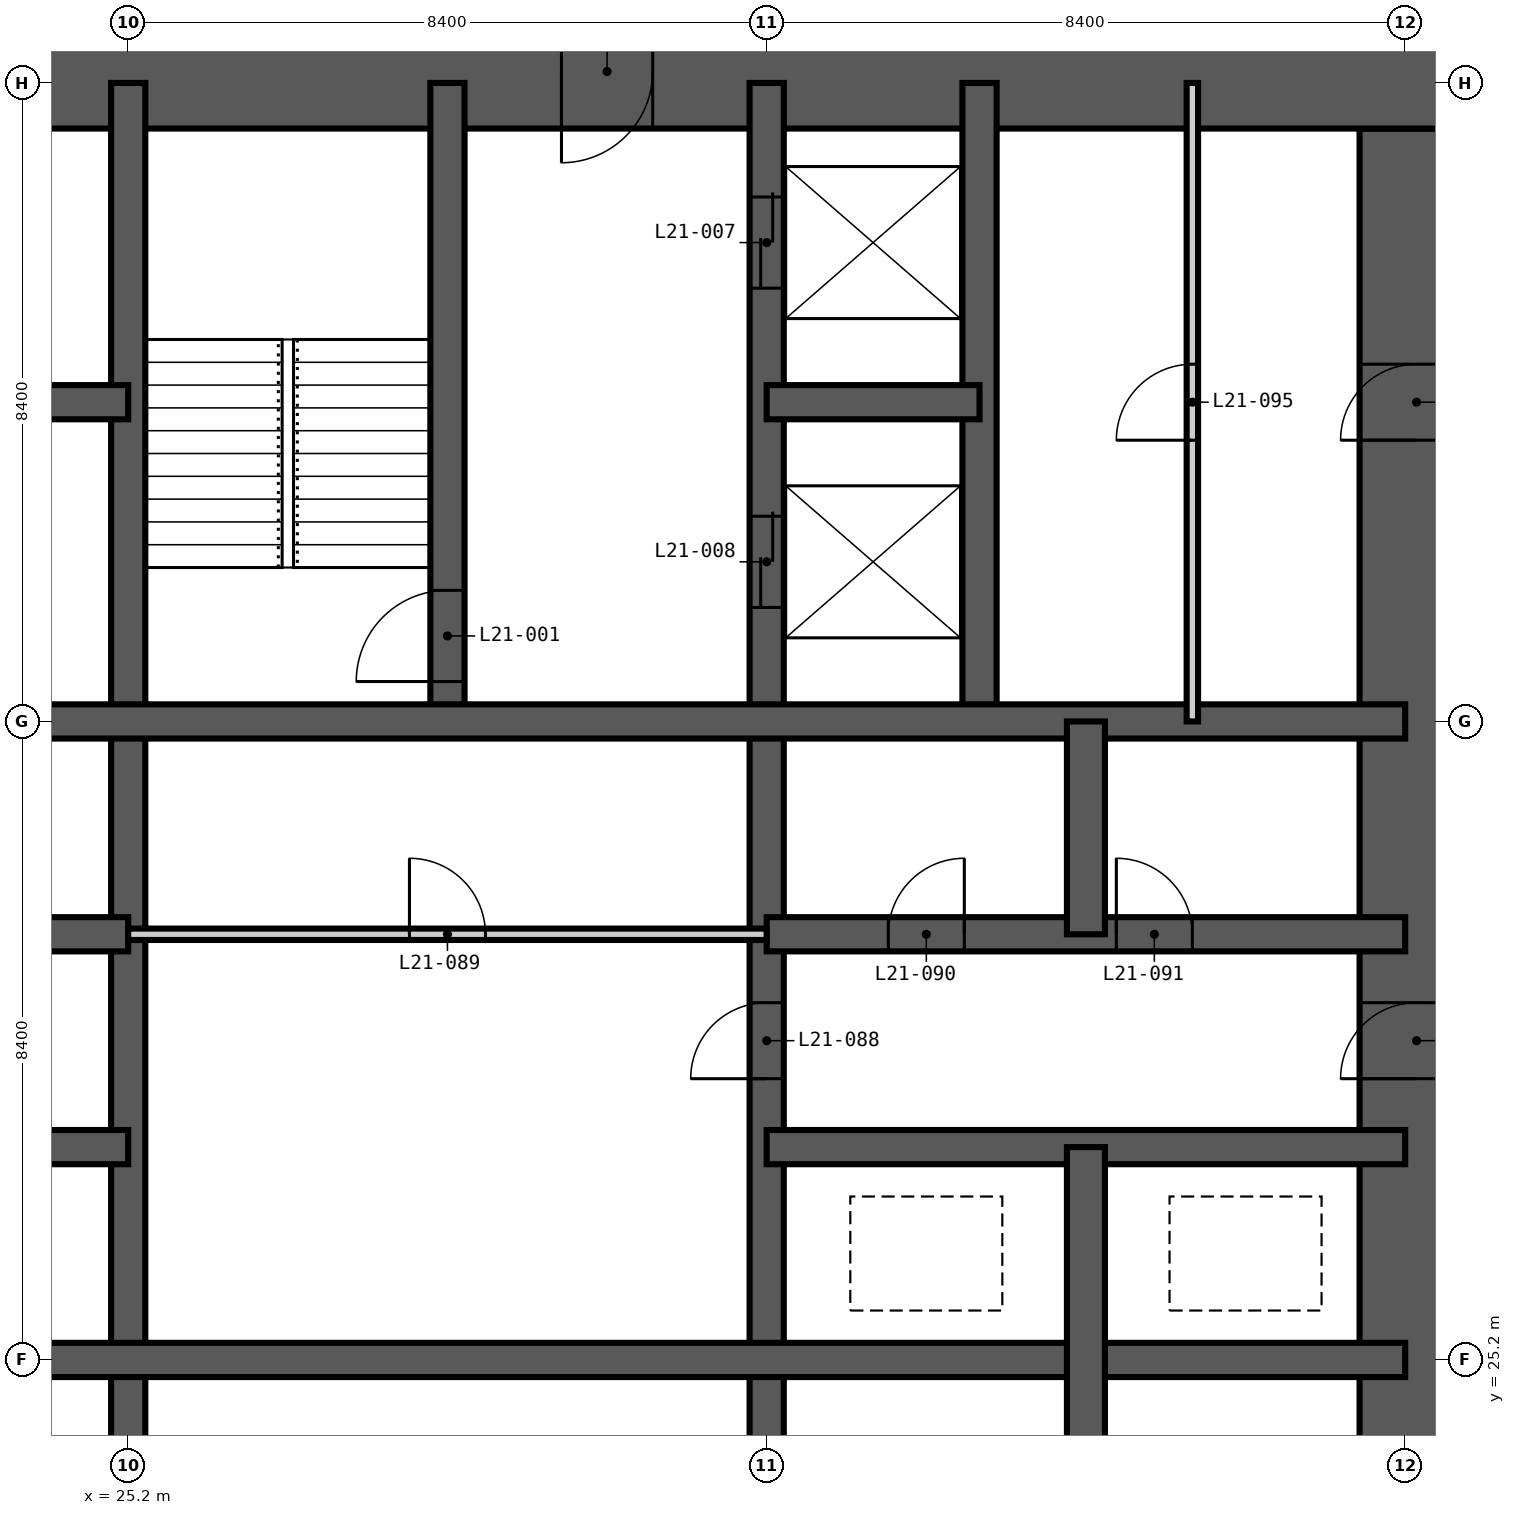
"""IFC4 building model, lengths in metres.
Left out: names, types, materials, properties, quantities, classifications, styles, units other than length and angle.
Written with IfcOpenShell. Run it as: python <this file> out.ifc"""

import sys

from ifc_helpers import new_model, si_unit, direction, frame, frame_2d, origin, place, context, subcontext, project, spatial, rectangle, extrude, element, fill, save


model = new_model("IFC4")
c1 = context("Model", 3, precision=1e-05, world=origin(), true_north=direction((0.0, 1.0)))
c2 = subcontext(c1, "Body", "Model", "MODEL_VIEW")
j1 = project(units=[si_unit("LENGTHUNIT", "METRE"), si_unit("PLANEANGLEUNIT", "RADIAN")], contexts=[c1])
p1 = place(None, origin())
s1 = spatial("IfcSite", under=j1, at=p1, CompositionType="ELEMENT")
p2 = place(p1, origin())
s2 = spatial("IfcBuilding", under=s1, at=p2, CompositionType="ELEMENT")
p3 = place(p2, frame((0.0, 0.0, 84.6)))
s3 = spatial("IfcBuildingStorey", under=s2, at=p3, CompositionType="ELEMENT", Elevation=84.6)
p4 = place(p3, frame((42.15, 17.4, -0.35), z_axis=(0.0, 0.0, 1.0), x_axis=(0.0, 1.0, 0.0)))
e1 = element("IfcWall", 1, at=p4, inside=s3, PredefinedType="SHEAR", context=c2, shape_type="SweptSolid", body=[
    extrude(rectangle(XDim=24.0, YDim=1.5, at=frame_2d((12.0, 0.0))), origin(), (0.0, 0.0, 1.0), 3.55),
])
p5 = place(p4, frame((0.2, 0.0, 0.35)))
e2 = element("IfcOpeningElement", 2, at=p5, cuts=e1, PredefinedType="OPENING", context=c2, shape_type="SweptSolid", body=[
    extrude(rectangle(XDim=1.2, YDim=2.2, at=frame_2d((0.6, 1.1))), frame((0.0, 0.76, 0.0), z_axis=(0.0, -1.0, 0.0), x_axis=(1.0, 0.0, 0.0)), (0.0, 0.0, 1.0), 1.52),
])
p6 = place(p4, frame((11.5, 0.0, 0.35)))
e3 = element("IfcOpeningElement", 3, at=p6, cuts=e1, PredefinedType="OPENING", context=c2, shape_type="SweptSolid", body=[
    extrude(rectangle(XDim=1.0, YDim=2.1, at=frame_2d((0.5, 1.05))), frame((0.0, 0.76, 0.0), z_axis=(0.0, -1.0, 0.0), x_axis=(1.0, 0.0, 0.0)), (0.0, 0.0, 1.0), 1.52),
])
p7 = place(p4, frame((19.9, 0.0, 0.35)))
e4 = element("IfcOpeningElement", 4, at=p7, cuts=e1, PredefinedType="OPENING", context=c2, shape_type="SweptSolid", body=[
    extrude(rectangle(XDim=1.0, YDim=2.1, at=frame_2d((0.5, 1.05))), frame((0.0, 0.76, 0.0), z_axis=(0.0, -1.0, 0.0), x_axis=(1.0, 0.0, 0.0)), (0.0, 0.0, 1.0), 1.52),
])
p8 = place(p3, frame((42.9, 42.15, -0.35), z_axis=(0.0, 0.0, 1.0), x_axis=(-1.0, 0.0, 0.0)))
e5 = element("IfcWall", 5, at=p8, inside=s3, PredefinedType="SHEAR", context=c2, shape_type="SweptSolid", body=[
    extrude(rectangle(XDim=27.0, YDim=1.5, at=frame_2d((13.5, 0.0))), origin(), (0.0, 0.0, 1.0), 3.55),
])
p9 = place(p8, frame((21.4, 0.0, 0.35)))
e6 = element("IfcOpeningElement", 6, at=p9, cuts=e5, PredefinedType="OPENING", context=c2, shape_type="SweptSolid", body=[
    extrude(rectangle(XDim=1.0, YDim=2.1, at=frame_2d((0.5, 1.05))), frame((0.0, 0.76, 0.0), z_axis=(0.0, -1.0, 0.0), x_axis=(1.0, 0.0, 0.0)), (0.0, 0.0, 1.0), 1.52),
])
p10 = place(p8, frame((10.8, 0.0, 0.35)))
e7 = element("IfcOpeningElement", 7, at=p10, cuts=e5, PredefinedType="OPENING", context=c2, shape_type="SweptSolid", body=[
    extrude(rectangle(XDim=1.2, YDim=2.2, at=frame_2d((0.6, 1.1))), frame((0.0, 0.76, 0.0), z_axis=(0.0, -1.0, 0.0), x_axis=(1.0, 0.0, 0.0)), (0.0, 0.0, 1.0), 1.52),
])
p11 = place(p3, frame((25.2, 16.8, -0.35), z_axis=(0.0, 0.0, 1.0), x_axis=(0.0, 1.0, 0.0)))
e8 = element("IfcWall", 8, at=p11, inside=s3, PredefinedType="SHEAR", context=c2, shape_type="SweptSolid", body=[
    extrude(rectangle(XDim=25.2, YDim=0.45, at=frame_2d((12.6, 0.0))), origin(), (0.0, 0.0, 1.0), 3.55),
])
p12 = place(p3, frame((29.4, 33.6, -0.35), z_axis=(0.0, 0.0, 1.0), x_axis=(0.0, 1.0, 0.0)))
e9 = element("IfcWall", 9, at=p12, inside=s3, PredefinedType="SHEAR", context=c2, shape_type="SweptSolid", body=[
    extrude(rectangle(XDim=8.4, YDim=0.45, at=frame_2d((4.2, 0.0))), origin(), (0.0, 0.0, 1.0), 3.55),
])
p13 = place(p12, frame((0.525, 0.0, 0.35)))
e10 = element("IfcOpeningElement", 10, at=p13, cuts=e9, PredefinedType="OPENING", context=c2, shape_type="SweptSolid", body=[
    extrude(rectangle(XDim=1.2, YDim=2.2, at=frame_2d((0.6, 1.1))), frame((0.0, 0.235, 0.0), z_axis=(0.0, -1.0, 0.0), x_axis=(1.0, 0.0, 0.0)), (0.0, 0.0, 1.0), 0.47),
])
p14 = place(p3, frame((33.6, 16.8, -0.35), z_axis=(0.0, 0.0, 1.0), x_axis=(0.0, 1.0, 0.0)))
e11 = element("IfcWall", 11, at=p14, inside=s3, PredefinedType="SHEAR", context=c2, shape_type="SweptSolid", body=[
    extrude(rectangle(XDim=25.2, YDim=0.45, at=frame_2d((12.6, 0.0))), origin(), (0.0, 0.0, 1.0), 3.55),
])
p15 = place(p14, frame((22.5, 0.0, 0.35)))
e12 = element("IfcOpeningElement", 12, at=p15, cuts=e11, PredefinedType="OPENING", context=c2, shape_type="SweptSolid", body=[
    extrude(rectangle(XDim=1.2, YDim=2.2, at=frame_2d((0.6, 1.1))), frame((0.0, 0.235, 0.0), z_axis=(0.0, -1.0, 0.0), x_axis=(1.0, 0.0, 0.0)), (0.0, 0.0, 1.0), 0.47),
])
p16 = place(p14, frame((18.3, 0.0, 0.35)))
e13 = element("IfcOpeningElement", 13, at=p16, cuts=e11, PredefinedType="OPENING", context=c2, shape_type="SweptSolid", body=[
    extrude(rectangle(XDim=1.2, YDim=2.2, at=frame_2d((0.6, 1.1))), frame((0.0, 0.235, 0.0), z_axis=(0.0, -1.0, 0.0), x_axis=(1.0, 0.0, 0.0)), (0.0, 0.0, 1.0), 0.47),
])
p17 = place(p14, frame((12.1, 0.0, 0.35)))
e14 = element("IfcOpeningElement", 14, at=p17, cuts=e11, PredefinedType="OPENING", context=c2, shape_type="SweptSolid", body=[
    extrude(rectangle(XDim=1.0, YDim=2.1, at=frame_2d((0.5, 1.05))), frame((0.0, 0.235, 0.0), z_axis=(0.0, -1.0, 0.0), x_axis=(1.0, 0.0, 0.0)), (0.0, 0.0, 1.0), 0.47),
])
p18 = place(p3, frame((36.4, 33.6, -0.35), z_axis=(0.0, 0.0, 1.0), x_axis=(0.0, 1.0, 0.0)))
e15 = element("IfcWall", 15, at=p18, inside=s3, PredefinedType="SHEAR", context=c2, shape_type="SweptSolid", body=[
    extrude(rectangle(XDim=8.4, YDim=0.45, at=frame_2d((4.2, 0.0))), origin(), (0.0, 0.0, 1.0), 3.55),
])
p19 = place(p3, frame((16.8, 25.2, -0.35), z_axis=(0.0, 0.0, 1.0), x_axis=(1.0, 0.0, 0.0)))
e16 = element("IfcWall", 16, at=p19, inside=s3, PredefinedType="SHEAR", context=c2, shape_type="SweptSolid", body=[
    extrude(rectangle(XDim=25.2, YDim=0.45, at=frame_2d((12.6, 0.0))), origin(), (0.0, 0.0, 1.0), 3.55),
])
p20 = place(p3, frame((16.8, 28.0, -0.35), z_axis=(0.0, 0.0, 1.0), x_axis=(1.0, 0.0, 0.0)))
e17 = element("IfcWall", 17, at=p20, inside=s3, PredefinedType="SHEAR", context=c2, shape_type="SweptSolid", body=[
    extrude(rectangle(XDim=8.4, YDim=0.45, at=frame_2d((4.2, 0.0))), origin(), (0.0, 0.0, 1.0), 3.55),
])
p21 = place(p20, frame((1.55, 0.0, 0.35)))
e18 = element("IfcOpeningElement", 18, at=p21, cuts=e17, PredefinedType="OPENING", context=c2, shape_type="SweptSolid", body=[
    extrude(rectangle(XDim=1.1, YDim=2.2, at=frame_2d((0.55, 1.1))), frame((0.0, 0.235, 0.0), z_axis=(0.0, -1.0, 0.0), x_axis=(1.0, 0.0, 0.0)), (0.0, 0.0, 1.0), 0.47),
])
p22 = place(p20, frame((5.75, 0.0, 0.35)))
e19 = element("IfcOpeningElement", 19, at=p22, cuts=e17, PredefinedType="OPENING", context=c2, shape_type="SweptSolid", body=[
    extrude(rectangle(XDim=1.1, YDim=2.2, at=frame_2d((0.55, 1.1))), frame((0.0, 0.235, 0.0), z_axis=(0.0, -1.0, 0.0), x_axis=(1.0, 0.0, 0.0)), (0.0, 0.0, 1.0), 0.47),
])
p23 = place(p3, frame((33.6, 28.0, -0.35), z_axis=(0.0, 0.0, 1.0), x_axis=(1.0, 0.0, 0.0)))
e20 = element("IfcWall", 20, at=p23, inside=s3, PredefinedType="SHEAR", context=c2, shape_type="SweptSolid", body=[
    extrude(rectangle(XDim=8.4, YDim=0.45, at=frame_2d((4.2, 0.0))), origin(), (0.0, 0.0, 1.0), 3.55),
])
p24 = place(p3, frame((16.8, 30.8, -0.35), z_axis=(0.0, 0.0, 1.0), x_axis=(1.0, 0.0, 0.0)))
e21 = element("IfcWall", 21, at=p24, inside=s3, PredefinedType="SHEAR", context=c2, shape_type="SweptSolid", body=[
    extrude(rectangle(XDim=8.4, YDim=0.45, at=frame_2d((4.2, 0.0))), origin(), (0.0, 0.0, 1.0), 3.55),
])
p25 = place(p24, frame((1.55, 0.0, 0.35)))
e22 = element("IfcOpeningElement", 22, at=p25, cuts=e21, PredefinedType="OPENING", context=c2, shape_type="SweptSolid", body=[
    extrude(rectangle(XDim=1.1, YDim=2.2, at=frame_2d((0.55, 1.1))), frame((0.0, 0.235, 0.0), z_axis=(0.0, -1.0, 0.0), x_axis=(1.0, 0.0, 0.0)), (0.0, 0.0, 1.0), 0.47),
])
p26 = place(p24, frame((5.75, 0.0, 0.35)))
e23 = element("IfcOpeningElement", 23, at=p26, cuts=e21, PredefinedType="OPENING", context=c2, shape_type="SweptSolid", body=[
    extrude(rectangle(XDim=1.1, YDim=2.2, at=frame_2d((0.55, 1.1))), frame((0.0, 0.235, 0.0), z_axis=(0.0, -1.0, 0.0), x_axis=(1.0, 0.0, 0.0)), (0.0, 0.0, 1.0), 0.47),
])
p27 = place(p3, frame((33.6, 30.8, -0.35), z_axis=(0.0, 0.0, 1.0), x_axis=(1.0, 0.0, 0.0)))
e24 = element("IfcWall", 24, at=p27, inside=s3, PredefinedType="SHEAR", context=c2, shape_type="SweptSolid", body=[
    extrude(rectangle(XDim=8.4, YDim=0.45, at=frame_2d((4.2, 0.0))), origin(), (0.0, 0.0, 1.0), 3.55),
])
p28 = place(p27, frame((1.6, 0.0, 0.35)))
e25 = element("IfcOpeningElement", 25, at=p28, cuts=e24, PredefinedType="OPENING", context=c2, shape_type="SweptSolid", body=[
    extrude(rectangle(XDim=1.0, YDim=2.1, at=frame_2d((0.5, 1.05))), frame((0.0, 0.235, 0.0), z_axis=(0.0, -1.0, 0.0), x_axis=(1.0, 0.0, 0.0)), (0.0, 0.0, 1.0), 0.47),
])
p29 = place(p27, frame((4.6, 0.0, 0.35)))
e26 = element("IfcOpeningElement", 26, at=p29, cuts=e24, PredefinedType="OPENING", context=c2, shape_type="SweptSolid", body=[
    extrude(rectangle(XDim=1.0, YDim=2.1, at=frame_2d((0.5, 1.05))), frame((0.0, 0.235, 0.0), z_axis=(0.0, -1.0, 0.0), x_axis=(1.0, 0.0, 0.0)), (0.0, 0.0, 1.0), 0.47),
])
p30 = place(p3, frame((16.8, 33.6, -0.35), z_axis=(0.0, 0.0, 1.0), x_axis=(1.0, 0.0, 0.0)))
e27 = element("IfcWall", 27, at=p30, inside=s3, PredefinedType="SHEAR", context=c2, shape_type="SweptSolid", body=[
    extrude(rectangle(XDim=25.2, YDim=0.45, at=frame_2d((12.6, 0.0))), origin(), (0.0, 0.0, 1.0), 3.55),
])
p31 = place(p3, frame((16.8, 37.8, -0.35), z_axis=(0.0, 0.0, 1.0), x_axis=(1.0, 0.0, 0.0)))
e28 = element("IfcWall", 28, at=p31, inside=s3, PredefinedType="SHEAR", context=c2, shape_type="SweptSolid", body=[
    extrude(rectangle(XDim=8.4, YDim=0.45, at=frame_2d((4.2, 0.0))), origin(), (0.0, 0.0, 1.0), 3.55),
])
p32 = place(p3, frame((33.6, 37.8, -0.35), z_axis=(0.0, 0.0, 1.0), x_axis=(1.0, 0.0, 0.0)))
e29 = element("IfcWall", 29, at=p32, inside=s3, PredefinedType="SHEAR", context=c2, shape_type="SweptSolid", body=[
    extrude(rectangle(XDim=2.8, YDim=0.45, at=frame_2d((1.4, 0.0))), origin(), (0.0, 0.0, 1.0), 3.55),
])
p33 = place(p3, frame((37.8, 16.8, -0.35), z_axis=(0.0, 0.0, 1.0), x_axis=(0.0, 1.0, 0.0)))
e30 = element("IfcWall", 30, at=p33, inside=s3, PredefinedType="SHEAR", context=c2, shape_type="SweptSolid", body=[
    extrude(rectangle(XDim=11.2, YDim=0.5, at=frame_2d((5.6, 0.0))), origin(), (0.0, 0.0, 1.0), 3.55),
])
p34 = place(p3, frame((37.8, 30.8, -0.35), z_axis=(0.0, 0.0, 1.0), x_axis=(0.0, 1.0, 0.0)))
e31 = element("IfcWall", 31, at=p34, inside=s3, PredefinedType="SHEAR", context=c2, shape_type="SweptSolid", body=[
    extrude(rectangle(XDim=2.8, YDim=0.5, at=frame_2d((1.4, 0.0))), origin(), (0.0, 0.0, 1.0), 3.55),
])
p35 = place(p3, frame((39.2, 33.6, 0.0), z_axis=(0.0, 0.0, 1.0), x_axis=(0.0, 1.0, 0.0)))
e32 = element("IfcWall", 32, at=p35, inside=s3, PredefinedType="PARTITIONING", context=c2, shape_type="SweptSolid", body=[
    extrude(rectangle(XDim=8.4, YDim=0.15, at=frame_2d((4.2, 0.0))), origin(), (0.0, 0.0, 1.0), 3.2),
])
p36 = place(p35, frame((3.7, 0.0, 0.0)))
e33 = element("IfcOpeningElement", 33, at=p36, cuts=e32, PredefinedType="OPENING", context=c2, shape_type="SweptSolid", body=[
    extrude(rectangle(XDim=1.0, YDim=2.1, at=frame_2d((0.5, 1.05))), frame((0.0, 0.085, 0.0), z_axis=(0.0, -1.0, 0.0), x_axis=(1.0, 0.0, 0.0)), (0.0, 0.0, 1.0), 0.17),
])
p37 = place(p3, frame((25.2, 30.8, 0.0), z_axis=(0.0, 0.0, 1.0), x_axis=(1.0, 0.0, 0.0)))
e34 = element("IfcWall", 34, at=p37, inside=s3, PredefinedType="PARTITIONING", context=c2, shape_type="SweptSolid", body=[
    extrude(rectangle(XDim=8.4, YDim=0.15, at=frame_2d((4.2, 0.0))), origin(), (0.0, 0.0, 1.0), 3.2),
])
p38 = place(p37, frame((3.7, 0.0, 0.0)))
e35 = element("IfcOpeningElement", 35, at=p38, cuts=e34, PredefinedType="OPENING", context=c2, shape_type="SweptSolid", body=[
    extrude(rectangle(XDim=1.0, YDim=2.1, at=frame_2d((0.5, 1.05))), frame((0.0, 0.085, 0.0), z_axis=(0.0, -1.0, 0.0), x_axis=(1.0, 0.0, 0.0)), (0.0, 0.0, 1.0), 0.17),
])
p39 = place(p13, origin())
e36 = element("IfcDoor", 36, at=p39, inside=s3, OperationType="SINGLE_SWING_LEFT", PredefinedType="DOOR", context=c2, shape_type="SweptSolid", body=[
    extrude(rectangle(XDim=1.2, YDim=2.2, at=frame_2d((0.6, 1.1))), frame((0.0, 0.025, 0.0), z_axis=(0.0, -1.0, 0.0), x_axis=(1.0, 0.0, 0.0)), (0.0, 0.0, 1.0), 0.05),
])
fill(e10, e36)
p40 = place(p15, origin())
e37 = element("IfcDoor", 37, at=p40, inside=s3, OperationType="DOUBLE_DOOR_SLIDING", PredefinedType="DOOR", context=c2, shape_type="SweptSolid", body=[
    extrude(rectangle(XDim=1.2, YDim=2.2, at=frame_2d((0.6, 1.1))), frame((0.0, 0.025, 0.0), z_axis=(0.0, -1.0, 0.0), x_axis=(1.0, 0.0, 0.0)), (0.0, 0.0, 1.0), 0.05),
])
fill(e12, e37)
p41 = place(p16, origin())
e38 = element("IfcDoor", 38, at=p41, inside=s3, OperationType="DOUBLE_DOOR_SLIDING", PredefinedType="DOOR", context=c2, shape_type="SweptSolid", body=[
    extrude(rectangle(XDim=1.2, YDim=2.2, at=frame_2d((0.6, 1.1))), frame((0.0, 0.025, 0.0), z_axis=(0.0, -1.0, 0.0), x_axis=(1.0, 0.0, 0.0)), (0.0, 0.0, 1.0), 0.05),
])
fill(e13, e38)
p42 = place(p17, origin())
e39 = element("IfcDoor", 39, at=p42, inside=s3, OperationType="SINGLE_SWING_LEFT", PredefinedType="DOOR", context=c2, shape_type="SweptSolid", body=[
    extrude(rectangle(XDim=1.0, YDim=2.1, at=frame_2d((0.5, 1.05))), frame((0.0, 0.025, 0.0), z_axis=(0.0, -1.0, 0.0), x_axis=(1.0, 0.0, 0.0)), (0.0, 0.0, 1.0), 0.05),
])
fill(e14, e39)
p43 = place(p38, origin())
e40 = element("IfcDoor", 40, at=p43, inside=s3, OperationType="SINGLE_SWING_LEFT", PredefinedType="DOOR", context=c2, shape_type="SweptSolid", body=[
    extrude(rectangle(XDim=1.0, YDim=2.1, at=frame_2d((0.5, 1.05))), frame((0.0, 0.025, 0.0), z_axis=(0.0, -1.0, 0.0), x_axis=(1.0, 0.0, 0.0)), (0.0, 0.0, 1.0), 0.05),
])
fill(e35, e40)
p44 = place(p28, origin())
e41 = element("IfcDoor", 41, at=p44, inside=s3, OperationType="SINGLE_SWING_RIGHT", PredefinedType="DOOR", context=c2, shape_type="SweptSolid", body=[
    extrude(rectangle(XDim=1.0, YDim=2.1, at=frame_2d((0.5, 1.05))), frame((0.0, 0.025, 0.0), z_axis=(0.0, -1.0, 0.0), x_axis=(1.0, 0.0, 0.0)), (0.0, 0.0, 1.0), 0.05),
])
fill(e25, e41)
p45 = place(p29, origin())
e42 = element("IfcDoor", 42, at=p45, inside=s3, OperationType="SINGLE_SWING_LEFT", PredefinedType="DOOR", context=c2, shape_type="SweptSolid", body=[
    extrude(rectangle(XDim=1.0, YDim=2.1, at=frame_2d((0.5, 1.05))), frame((0.0, 0.025, 0.0), z_axis=(0.0, -1.0, 0.0), x_axis=(1.0, 0.0, 0.0)), (0.0, 0.0, 1.0), 0.05),
])
fill(e26, e42)
p46 = place(p6, origin())
e43 = element("IfcDoor", 43, at=p46, inside=s3, OperationType="SINGLE_SWING_LEFT", PredefinedType="DOOR", context=c2, shape_type="SweptSolid", body=[
    extrude(rectangle(XDim=1.0, YDim=2.1, at=frame_2d((0.5, 1.05))), frame((0.0, 0.025, 0.0), z_axis=(0.0, -1.0, 0.0), x_axis=(1.0, 0.0, 0.0)), (0.0, 0.0, 1.0), 0.05),
])
fill(e3, e43)
p47 = place(p10, origin())
e44 = element("IfcDoor", 44, at=p47, inside=s3, OperationType="SINGLE_SWING_RIGHT", PredefinedType="DOOR", context=c2, shape_type="SweptSolid", body=[
    extrude(rectangle(XDim=1.2, YDim=2.2, at=frame_2d((0.6, 1.1))), frame((0.0, 0.025, 0.0), z_axis=(0.0, -1.0, 0.0), x_axis=(1.0, 0.0, 0.0)), (0.0, 0.0, 1.0), 0.05),
])
fill(e7, e44)
p48 = place(p7, origin())
e45 = element("IfcDoor", 45, at=p48, inside=s3, OperationType="SINGLE_SWING_LEFT", PredefinedType="DOOR", context=c2, shape_type="SweptSolid", body=[
    extrude(rectangle(XDim=1.0, YDim=2.1, at=frame_2d((0.5, 1.05))), frame((0.0, 0.025, 0.0), z_axis=(0.0, -1.0, 0.0), x_axis=(1.0, 0.0, 0.0)), (0.0, 0.0, 1.0), 0.05),
])
fill(e4, e45)
p49 = place(p36, origin())
e46 = element("IfcDoor", 46, at=p49, inside=s3, OperationType="SINGLE_SWING_LEFT", PredefinedType="DOOR", context=c2, shape_type="SweptSolid", body=[
    extrude(rectangle(XDim=1.0, YDim=2.1, at=frame_2d((0.5, 1.05))), frame((0.0, 0.025, 0.0), z_axis=(0.0, -1.0, 0.0), x_axis=(1.0, 0.0, 0.0)), (0.0, 0.0, 1.0), 0.05),
])
fill(e33, e46)
save(model, sys.argv[1])
